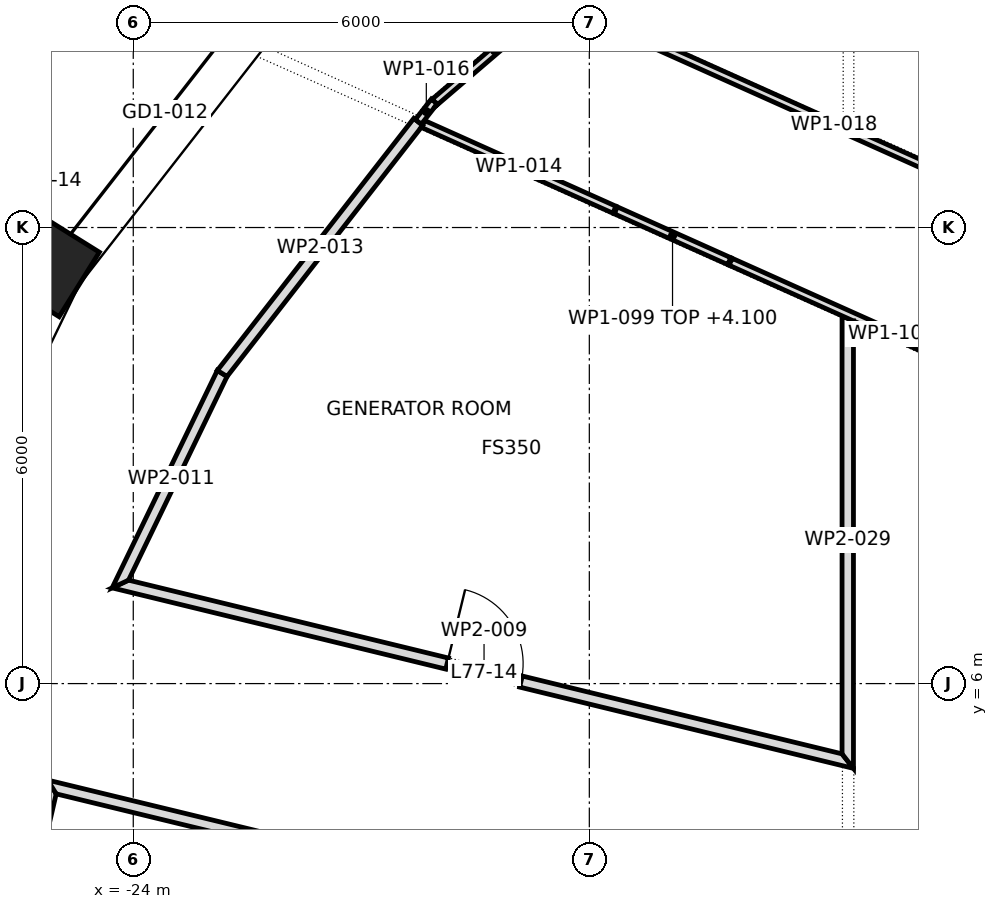
"""IFC4 building model, lengths in metres.
Left out: names, types, materials, properties, quantities, classifications, styles, units other than length and angle.
Written with IfcOpenShell. Run it as: python <this file> out.ifc"""

import sys

from ifc_helpers import new_model, si_unit, direction, frame, frame_2d, origin, origin_2d, place, context, subcontext, project, spatial, polyline, rectangle, outline, extrude, element, fill, save


model = new_model("IFC4")
c1 = context("Model", 3, precision=1e-05, world=origin(), true_north=direction((0.0, 1.0)))
c2 = subcontext(c1, "Body", "Model", "MODEL_VIEW")
j1 = project(units=[si_unit("LENGTHUNIT", "METRE"), si_unit("PLANEANGLEUNIT", "RADIAN")], contexts=[c1])
p1 = place(None, origin())
s1 = spatial("IfcSite", under=j1, at=p1, CompositionType="ELEMENT")
p2 = place(p1, origin())
s2 = spatial("IfcBuilding", under=s1, at=p2, CompositionType="ELEMENT")
p3 = place(p2, frame((0.0, 0.0, 328.3)))
s3 = spatial("IfcBuildingStorey", under=s2, at=p3, CompositionType="ELEMENT", Elevation=328.3)
p4 = place(p3, frame((-25.135, 11.516, 0.0), z_axis=(0.0, 0.0, 1.0), x_axis=(-0.529140496257, -0.848534227489, 0.0)))
e1 = element("IfcColumn", 1, at=p4, inside=s3, PredefinedType="COLUMN", context=c2, shape_type="SweptSolid", body=[
    extrude(rectangle(XDim=1.0, YDim=1.0, at=origin_2d()), origin(), (0.0, 0.0, 1.0), 5.0),
])
p5 = place(p3, frame((-25.053, 4.714, 0.0), z_axis=(0.0, 0.0, 1.0), x_axis=(-0.225380874536, -0.974270733109, 0.0)))
e2 = element("IfcWall", 2, at=p5, inside=s3, PredefinedType="PARTITIONING", context=c2, shape_type="SweptSolid", body=[
    extrude(outline(polyline([(2.702, -0.075), (2.702, -0.074), (2.685, 0.075), (1.418, 0.075), (0.152, 0.075), (0.0, -0.075), (0.0, -0.075), (1.351, -0.075), (2.702, -0.075)])), origin(), (0.0, 0.0, 1.0), 4.65),
])
p6 = place(p3, frame((-24.26, 7.332, 0.0), z_axis=(0.0, 0.0, 1.0), x_axis=(0.971617763283, -0.236556382439, 0.0)))
e3 = element("IfcWall", 3, at=p6, inside=s3, PredefinedType="PARTITIONING", context=c2, shape_type="SweptSolid", body=[
    extrude(outline(polyline([(0.0, -0.075), (1.673, -0.075), (3.346, -0.075), (5.019, -0.075), (6.692, -0.075), (8.365, -0.075), (10.038, -0.075), (9.847, 0.075), (7.915, 0.075), (5.982, 0.075), (4.05, 0.075), (2.118, 0.075), (0.186, 0.075), (0.0, -0.075)])), origin(), (0.0, 0.0, 1.0), 4.65),
])
p7 = place(p6, frame((4.518, 0.0, 0.0)))
e4 = element("IfcOpeningElement", 4, at=p7, cuts=e3, PredefinedType="OPENING", context=c2, shape_type="SweptSolid", body=[
    extrude(rectangle(XDim=1.0, YDim=2.1, at=frame_2d((0.5, 1.05))), frame((0.0, 0.087, 0.0), z_axis=(0.0, -1.0, 0.0), x_axis=(1.0, 0.0, 0.0)), (0.0, 0.0, 1.0), 0.174),
])
p8 = place(p3, frame((-22.826, 10.087, 0.0), z_axis=(0.0, 0.0, 1.0), x_axis=(-0.435498679968, -0.900189368825, 0.0)))
e5 = element("IfcWall", 5, at=p8, inside=s3, PredefinedType="PARTITIONING", context=c2, shape_type="SweptSolid", body=[
    extrude(outline(polyline([(0.0, -0.075), (1.589, -0.075), (3.178, -0.075), (2.992, 0.075), (1.504, 0.075), (0.016, 0.075), (0.0, -0.075)])), origin(), (0.0, 0.0, 1.0), 4.65),
])
p9 = place(p3, frame((-20.25, 13.39, 0.0), z_axis=(0.0, 0.0, 1.0), x_axis=(-0.614788449528, -0.788692057984, 0.0)))
e6 = element("IfcWall", 6, at=p9, inside=s3, PredefinedType="PARTITIONING", context=c2, shape_type="SweptSolid", body=[
    extrude(outline(polyline([(4.205, -0.075), (4.205, -0.075), (4.189, 0.075), (2.792, 0.075), (1.396, 0.075), (0.0, 0.075), (0.0, -0.075), (1.402, -0.075), (2.803, -0.075), (4.205, -0.075)])), origin(), (0.0, 0.0, 1.0), 4.65),
])
p10 = place(p3, frame((-20.192, 13.364, 0.0), z_axis=(0.0, 0.0, 1.0), x_axis=(0.912635066967, -0.408775286121, 0.0)))
e7 = element("IfcWall", 7, at=p10, inside=s3, PredefinedType="PARTITIONING", context=c2, shape_type="SweptSolid", body=[
    extrude(outline(polyline([(0.0, 0.05), (0.0, -0.016), (0.009, -0.018), (0.001, -0.05), (1.387, -0.05), (2.773, -0.05), (2.773, 0.05), (1.386, 0.05), (0.0, 0.05)])), origin(), (0.0, 0.0, 1.0), 4.65),
])
p11 = place(p3, frame((-20.039, 13.659, 0.0), z_axis=(0.0, 0.0, 1.0), x_axis=(-0.61586559452, -0.787851235632, 0.0)))
e8 = element("IfcWall", 8, at=p11, inside=s3, PredefinedType="PARTITIONING", context=c2, shape_type="SweptSolid", body=[
    extrude(rectangle(XDim=0.342, YDim=0.1, at=frame_2d((0.171, 0.0))), origin(), (0.0, 0.0, 1.0), 4.65),
])
p12 = place(p3, frame((-18.435, 15.02, 0.0), z_axis=(0.0, 0.0, 1.0), x_axis=(-0.759626055976, -0.650360096471, 0.0)))
e9 = element("IfcWall", 9, at=p12, inside=s3, PredefinedType="PARTITIONING", context=c2, shape_type="SweptSolid", body=[
    extrude(outline(polyline([(0.0, -0.05), (2.112, -0.05), (2.094, 0.039), (2.145, 0.05), (2.145, 0.05), (0.063, 0.05), (0.034, 0.003), (0.0, -0.05)])), origin(), (0.0, 0.0, 1.0), 4.65),
])
p13 = place(p3, frame((-18.488, 15.012, 0.0), z_axis=(0.0, 0.0, 1.0), x_axis=(0.912473613394, -0.409135558048, 0.0)))
e10 = element("IfcWall", 10, at=p13, inside=s3, PredefinedType="PARTITIONING", context=c2, shape_type="SweptSolid", body=[
    extrude(outline(polyline([(0.0, 0.05), (0.0, 0.05), (0.063, -0.05), (1.67, -0.05), (3.277, -0.05), (4.883, -0.05), (6.49, -0.05), (8.096, -0.05), (8.096, 0.05), (6.477, 0.05), (4.858, 0.05), (3.239, 0.05), (1.619, 0.05), (0.0, 0.05)])), origin(), (0.0, 0.0, 1.0), 4.65),
])
p14 = place(p3, frame((-14.543, 2.086, 0.0), z_axis=(0.0, 0.0, 1.0), x_axis=(-0.971811892491, 0.23575759927, 0.0)))
e11 = element("IfcWall", 11, at=p14, inside=s3, PredefinedType="PARTITIONING", context=c2, shape_type="SweptSolid", body=[
    extrude(outline(polyline([(0.0, -0.075), (1.818, -0.075), (3.636, -0.075), (5.454, -0.075), (7.272, -0.075), (9.09, -0.075), (10.908, -0.075), (10.757, 0.075), (8.984, 0.075), (7.21, 0.075), (5.437, 0.075), (3.664, 0.075), (1.891, 0.075), (0.118, 0.075), (0.0, -0.075), (0.0, -0.075)])), origin(), (0.0, 0.0, 1.0), 4.65),
])
p15 = place(p14, frame((4.946, 0.0, 0.0)))
e12 = element("IfcOpeningElement", 12, at=p15, cuts=e11, PredefinedType="OPENING", context=c2, shape_type="SweptSolid", body=[
    extrude(rectangle(XDim=1.0, YDim=2.1, at=frame_2d((0.5, 1.05))), frame((0.0, 0.087, 0.0), z_axis=(0.0, -1.0, 0.0), x_axis=(1.0, 0.0, 0.0)), (0.0, 0.0, 1.0), 0.174),
])
p16 = place(p3, frame((-14.6, 4.885, 0.0), z_axis=(0.0, 0.0, 1.0), x_axis=(0.0, 1.0, 0.0)))
e13 = element("IfcWall", 13, at=p16, inside=s3, PredefinedType="PARTITIONING", context=c2, shape_type="SweptSolid", body=[
    extrude(outline(polyline([(0.0, -0.075), (1.962, -0.075), (3.924, -0.075), (5.886, -0.075), (5.953, 0.074), (5.953, 0.075), (4.032, 0.075), (2.112, 0.075), (0.191, 0.075), (0.191, 0.075), (0.191, 0.075), (0.095, 0.0), (0.0, -0.075)])), origin(), (0.0, 0.0, 1.0), 4.65),
])
p17 = place(p3, frame((-17.661, 12.23, 0.0), z_axis=(0.0, 0.0, 1.0), x_axis=(0.912640241226, -0.408763733831, 0.0)))
e14 = element("IfcWall", 14, at=p17, inside=s3, PredefinedType="PARTITIONING", context=c2, shape_type="SweptSolid", body=[
    extrude(outline(polyline([(0.0, 0.05), (0.0, -0.05), (1.656, -0.05), (1.656, 0.05), (0.0, 0.05)])), origin(), (0.0, 0.0, 1.0), 4.1),
])
p18 = place(p3, frame((-16.15, 11.553, 0.0), z_axis=(0.0, 0.0, 1.0), x_axis=(0.912638165026, -0.408768369296, 0.0)))
e15 = element("IfcWall", 15, at=p18, inside=s3, PredefinedType="PARTITIONING", context=c2, shape_type="SweptSolid", body=[
    extrude(outline(polyline([(0.0, -0.05), (1.799, -0.05), (1.802, -0.049), (1.803, -0.05), (3.23, -0.05), (4.657, -0.05), (4.657, 0.05), (3.104, 0.05), (1.552, 0.05), (0.0, 0.05), (0.0, -0.05)])), origin(), (0.0, 0.0, 1.0), 4.65),
])
p19 = place(p7, origin())
e16 = element("IfcDoor", 16, at=p19, inside=s3, OperationType="SINGLE_SWING_RIGHT", PredefinedType="DOOR", context=c2, shape_type="SweptSolid", body=[
    extrude(rectangle(XDim=1.0, YDim=2.1, at=frame_2d((0.5, 1.05))), frame((0.0, 0.025, 0.0), z_axis=(0.0, -1.0, 0.0), x_axis=(1.0, 0.0, 0.0)), (0.0, 0.0, 1.0), 0.05),
])
fill(e4, e16)
save(model, sys.argv[1])
